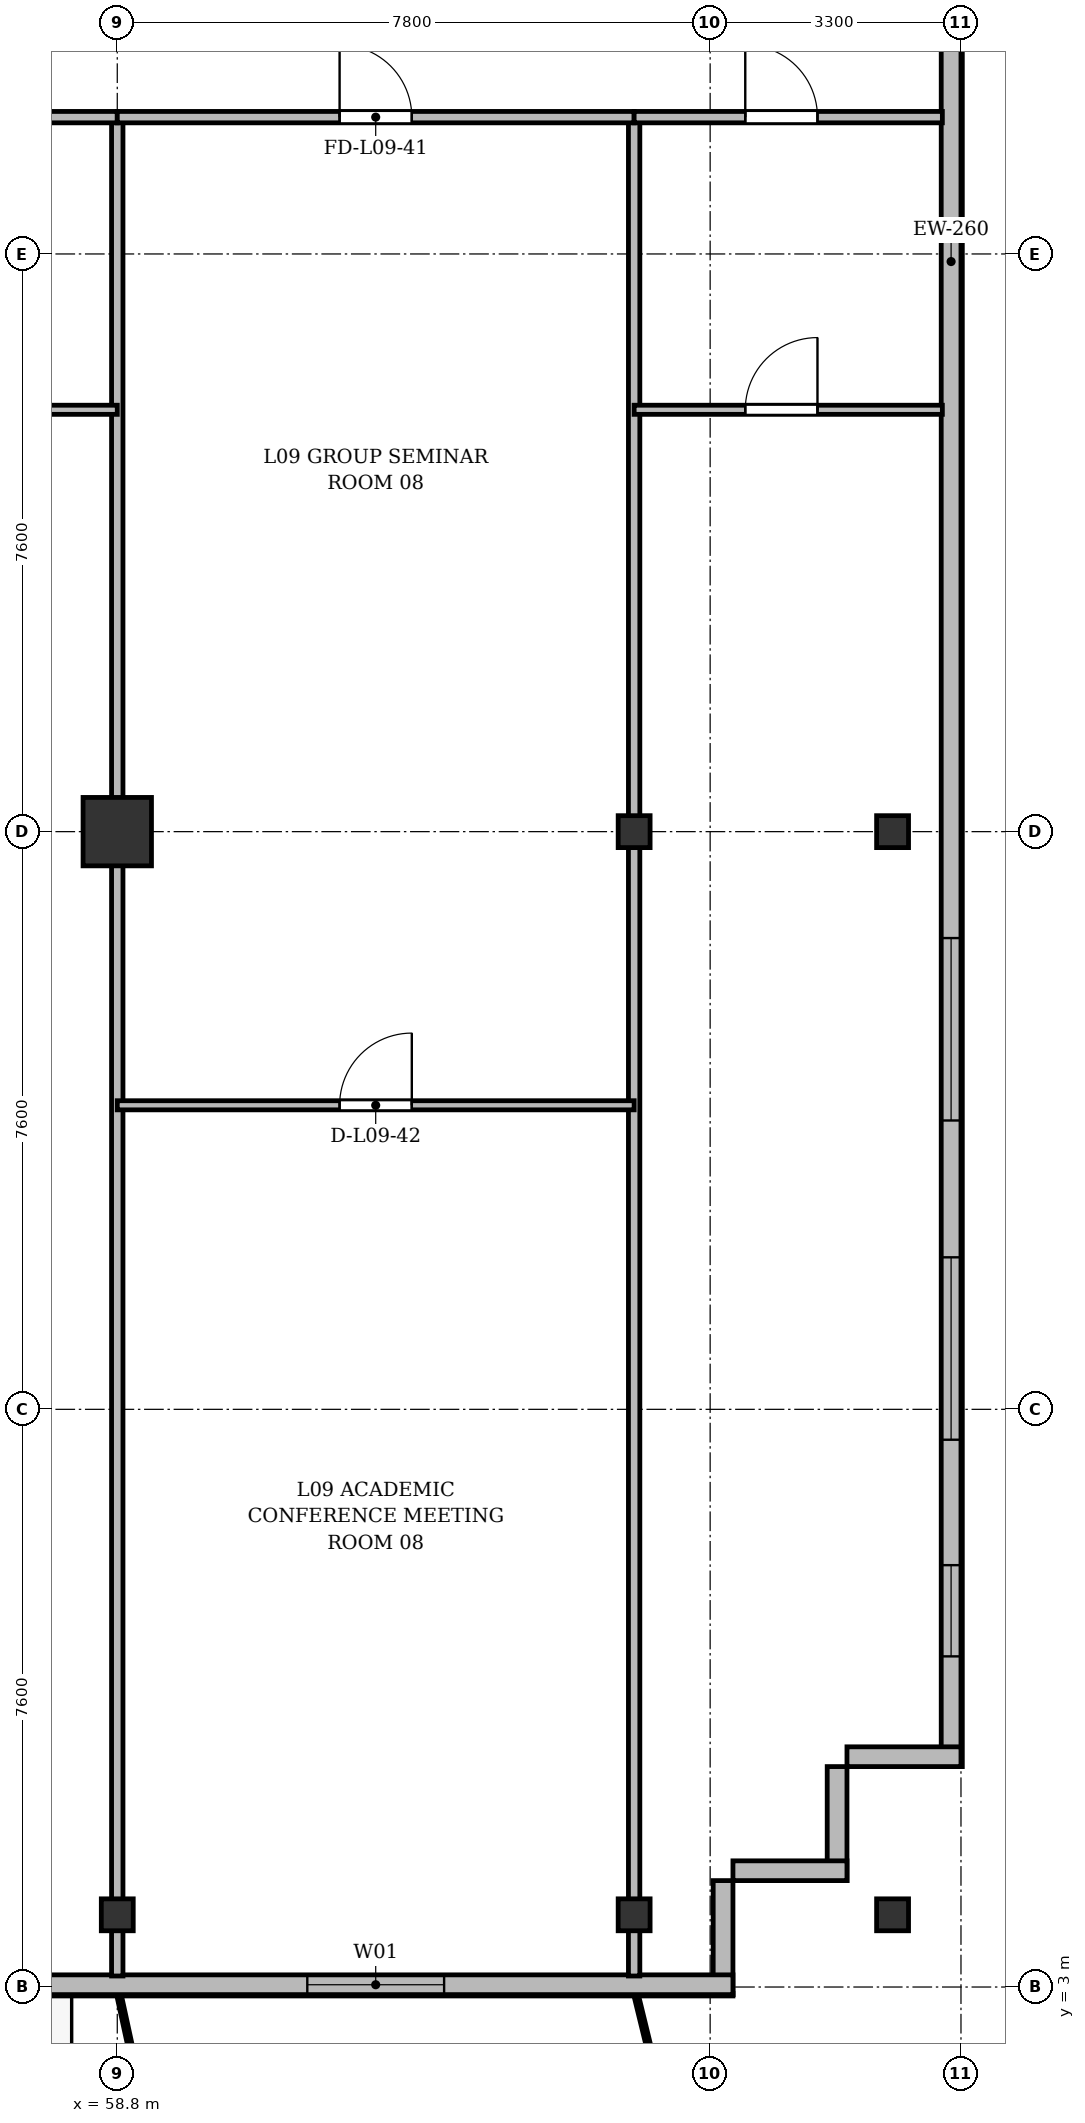
"""IFC4 building model, lengths in metres.
Left out: names, types, materials, properties, quantities, classifications, styles, units other than length and angle.
Written with IfcOpenShell. Run it as: python <this file> out.ifc"""

import sys

from ifc_helpers import new_model, si_unit, direction, frame, frame_2d, origin, origin_2d, place, context, subcontext, project, spatial, rectangle, i_section, extrude, source, transform, mapped, element, fill, save


model = new_model("IFC4")
c1 = context("Model", 3, precision=1e-05, world=origin(), true_north=direction((0.0, 1.0)))
c2 = subcontext(c1, "Body", "Model", "MODEL_VIEW")
j1 = project(units=[si_unit("LENGTHUNIT", "METRE"), si_unit("PLANEANGLEUNIT", "RADIAN")], contexts=[c1])
p1 = place(None, origin())
s1 = spatial("IfcSite", under=j1, at=p1, CompositionType="ELEMENT")
p2 = place(p1, origin())
s2 = spatial("IfcBuilding", under=s1, at=p2, CompositionType="ELEMENT")
p3 = place(p2, frame((0.0, 0.0, 37.9)))
s3 = spatial("IfcBuildingStorey", under=s2, at=p3, CompositionType="ELEMENT", Elevation=37.9)
m1 = source(origin(), c2, "Body", "SweptSolid", [
    extrude(i_section(OverallWidth=0.42, OverallDepth=0.42, WebThickness=0.026, FlangeThickness=0.04, at=origin_2d()), origin(), (0.0, 0.0, 1.0), 3.6),
])
p4 = place(p3, frame((58.8, 3.95, 0.0), z_axis=(0.0, 0.0, 1.0), x_axis=(1.0, 0.0, 0.0)))
e1 = element("IfcColumn", 1, at=p4, inside=s3, PredefinedType="COLUMN", context=c2, shape_type="MappedRepresentation", body=[
    mapped(m1, transform((0.0, 0.0, 0.0), x_axis=(1.0, 0.0, 0.0), y_axis=(0.0, 1.0, 0.0), z_axis=(0.0, 0.0, 1.0), scale=1.0)),
])
m2 = source(origin(), c2, "Body", "SweptSolid", [
    extrude(rectangle(XDim=0.9, YDim=0.9, at=origin_2d()), origin(), (0.0, 0.0, 1.0), 3.6),
])
p5 = place(p3, frame((58.8, 18.2, 0.0), z_axis=(0.0, 0.0, 1.0), x_axis=(1.0, 0.0, 0.0)))
e2 = element("IfcColumn", 2, at=p5, inside=s3, PredefinedType="COLUMN", context=c2, shape_type="MappedRepresentation", body=[
    mapped(m2, transform((0.0, 0.0, 0.0), x_axis=(1.0, 0.0, 0.0), y_axis=(0.0, 1.0, 0.0), z_axis=(0.0, 0.0, 1.0), scale=1.0)),
])
for number, where, z_axis, x_axis in (
    (3, (65.6, 3.95, 0.0), (0.0, 0.0, 1.0), (1.0, 0.0, 0.0)),
    (4, (65.6, 18.2, 0.0), (0.0, 0.0, 1.0), (1.0, 0.0, 0.0)),
    (5, (69.0, 3.95, 0.0), (0.0, 0.0, 1.0), (1.0, 0.0, 0.0)),
    (6, (69.0, 18.2, 0.0), (0.0, 0.0, 1.0), (1.0, 0.0, 0.0)),
):
    element("IfcColumn", number, at=place(p3, frame(where, z_axis=z_axis, x_axis=x_axis)), inside=s3, PredefinedType="COLUMN", context=c2, shape_type="MappedRepresentation", body=[
        mapped(m1, transform((0.0, 0.0, 0.0), x_axis=(1.0, 0.0, 0.0), y_axis=(0.0, 1.0, 0.0), z_axis=(0.0, 0.0, 1.0), scale=1.0)),
    ])
p6 = place(p3, frame((69.77, 45.5, 0.0), z_axis=(0.0, 0.0, 1.0), x_axis=(0.0, -1.0, 0.0)))
e7 = element("IfcWall", 7, at=p6, inside=s3, PredefinedType="SOLIDWALL", context=c2, shape_type="SweptSolid", body=[
    extrude(rectangle(XDim=39.6, YDim=0.26, at=frame_2d((19.8, 0.0))), origin(), (0.0, 0.0, 1.0), 3.34),
])
p7 = place(p6, frame((36.95, 0.0, 0.92)))
e8 = element("IfcOpeningElement", 8, at=p7, cuts=e7, PredefinedType="OPENING", context=c2, shape_type="SweptSolid", body=[
    extrude(rectangle(XDim=1.2, YDim=1.65, at=frame_2d((0.6, 0.825))), frame((0.0, 0.14, 0.0), z_axis=(0.0, -1.0, 0.0), x_axis=(1.0, 0.0, 0.0)), (0.0, 0.0, 1.0), 0.28),
])
p8 = place(p6, frame((32.9, 0.0, 0.92)))
e9 = element("IfcOpeningElement", 9, at=p8, cuts=e7, PredefinedType="OPENING", context=c2, shape_type="SweptSolid", body=[
    extrude(rectangle(XDim=2.4, YDim=2.1, at=frame_2d((1.2, 1.05))), frame((0.0, 0.14, 0.0), z_axis=(0.0, -1.0, 0.0), x_axis=(1.0, 0.0, 0.0)), (0.0, 0.0, 1.0), 0.28),
])
p9 = place(p6, frame((28.7, 0.0, 0.92)))
e10 = element("IfcOpeningElement", 10, at=p9, cuts=e7, PredefinedType="OPENING", context=c2, shape_type="SweptSolid", body=[
    extrude(rectangle(XDim=2.4, YDim=2.1, at=frame_2d((1.2, 1.05))), frame((0.0, 0.14, 0.0), z_axis=(0.0, -1.0, 0.0), x_axis=(1.0, 0.0, 0.0)), (0.0, 0.0, 1.0), 0.28),
])
p10 = place(p6, frame((7.5, 0.0, 0.92)))
e11 = element("IfcOpeningElement", 11, at=p10, cuts=e7, PredefinedType="OPENING", context=c2, shape_type="SweptSolid", body=[
    extrude(rectangle(XDim=2.4, YDim=2.1, at=frame_2d((1.2, 1.05))), frame((0.0, 0.14, 0.0), z_axis=(0.0, -1.0, 0.0), x_axis=(1.0, 0.0, 0.0)), (0.0, 0.0, 1.0), 0.28),
])
p11 = place(p6, frame((4.5, 0.0, 0.92)))
e12 = element("IfcOpeningElement", 12, at=p11, cuts=e7, PredefinedType="OPENING", context=c2, shape_type="SweptSolid", body=[
    extrude(rectangle(XDim=1.2, YDim=1.65, at=frame_2d((0.6, 0.825))), frame((0.0, 0.14, 0.0), z_axis=(0.0, -1.0, 0.0), x_axis=(1.0, 0.0, 0.0)), (0.0, 0.0, 1.0), 0.28),
])
p12 = place(p6, frame((1.15, 0.0, 0.92)))
e13 = element("IfcOpeningElement", 13, at=p12, cuts=e7, PredefinedType="OPENING", context=c2, shape_type="SweptSolid", body=[
    extrude(rectangle(XDim=1.2, YDim=1.65, at=frame_2d((0.6, 0.825))), frame((0.0, 0.14, 0.0), z_axis=(0.0, -1.0, 0.0), x_axis=(1.0, 0.0, 0.0)), (0.0, 0.0, 1.0), 0.28),
])
p13 = place(p3, frame((69.9, 6.03, 0.0), z_axis=(0.0, 0.0, 1.0), x_axis=(-1.0, 0.0, 0.0)))
e14 = element("IfcWall", 14, at=p13, inside=s3, PredefinedType="SOLIDWALL", context=c2, shape_type="SweptSolid", body=[
    extrude(rectangle(XDim=1.5, YDim=0.26, at=frame_2d((0.75, 0.0))), origin(), (0.0, 0.0, 1.0), 2.752),
])
for number, where, z_axis, x_axis in (
    (15, (68.27, 5.9, 0.0), (0.0, 0.0, 1.0), (0.0, -1.0, 0.0)),
    (16, (68.4, 4.53, 0.0), (0.0, 0.0, 1.0), (-1.0, 0.0, 0.0)),
):
    element("IfcWall", number, at=place(p3, frame(where, z_axis=z_axis, x_axis=x_axis)), inside=s3, PredefinedType="SOLIDWALL", context=c2, shape_type="SweptSolid", body=[
        extrude(rectangle(XDim=1.5, YDim=0.26, at=frame_2d((0.75, 0.0))), origin(), (0.0, 0.0, 1.0), 3.34),
    ])
p14 = place(p3, frame((66.77, 4.4, 0.0), z_axis=(0.0, 0.0, 1.0), x_axis=(0.0, -1.0, 0.0)))
e17 = element("IfcWall", 17, at=p14, inside=s3, PredefinedType="SOLIDWALL", context=c2, shape_type="SweptSolid", body=[
    extrude(rectangle(XDim=1.5, YDim=0.26, at=frame_2d((0.75, 0.0))), origin(), (0.0, 0.0, 1.0), 2.69),
])
p15 = place(p3, frame((66.9, 3.03, 0.0), z_axis=(0.0, 0.0, 1.0), x_axis=(-1.0, 0.0, 0.0)))
e18 = element("IfcWall", 18, at=p15, inside=s3, PredefinedType="SOLIDWALL", context=c2, shape_type="SweptSolid", body=[
    extrude(rectangle(XDim=59.4, YDim=0.26, at=frame_2d((29.7, 0.0))), origin(), (0.0, 0.0, 1.0), 3.34),
])
p16 = place(p15, frame((3.8, 0.0, 0.9)))
e19 = element("IfcOpeningElement", 19, at=p16, cuts=e18, PredefinedType="OPENING", context=c2, shape_type="SweptSolid", body=[
    extrude(rectangle(XDim=1.8, YDim=1.8, at=frame_2d((0.9, 0.9))), frame((0.0, 0.14, 0.0), z_axis=(0.0, -1.0, 0.0), x_axis=(1.0, 0.0, 0.0)), (0.0, 0.0, 1.0), 0.28),
])
p17 = place(p15, frame((9.565, 0.0, 0.0)))
e20 = element("IfcOpeningElement", 20, at=p17, cuts=e18, PredefinedType="OPENING", context=c2, shape_type="SweptSolid", body=[
    extrude(rectangle(XDim=1.2, YDim=2.2, at=frame_2d((0.6, 1.1))), frame((0.0, 0.14, 0.0), z_axis=(0.0, -1.0, 0.0), x_axis=(1.0, 0.0, 0.0)), (0.0, 0.0, 1.0), 0.28),
])
p18 = place(p15, frame((18.75, 0.0, 0.9)))
e21 = element("IfcOpeningElement", 21, at=p18, cuts=e18, PredefinedType="OPENING", context=c2, shape_type="SweptSolid", body=[
    extrude(rectangle(XDim=1.5, YDim=1.75, at=frame_2d((0.75, 0.875))), frame((0.0, 0.14, 0.0), z_axis=(0.0, -1.0, 0.0), x_axis=(1.0, 0.0, 0.0)), (0.0, 0.0, 1.0), 0.28),
])
p19 = place(p15, frame((28.7, 0.0, 0.9)))
e22 = element("IfcOpeningElement", 22, at=p19, cuts=e18, PredefinedType="OPENING", context=c2, shape_type="SweptSolid", body=[
    extrude(rectangle(XDim=2.0, YDim=1.95, at=frame_2d((1.0, 0.975))), frame((0.0, 0.14, 0.0), z_axis=(0.0, -1.0, 0.0), x_axis=(1.0, 0.0, 0.0)), (0.0, 0.0, 1.0), 0.28),
])
p20 = place(p15, frame((40.301, 0.0, 0.0)))
e23 = element("IfcOpeningElement", 23, at=p20, cuts=e18, PredefinedType="OPENING", context=c2, shape_type="SweptSolid", body=[
    extrude(rectangle(XDim=1.2, YDim=2.2, at=frame_2d((0.6, 1.1))), frame((0.0, 0.14, 0.0), z_axis=(0.0, -1.0, 0.0), x_axis=(1.0, 0.0, 0.0)), (0.0, 0.0, 1.0), 0.28),
])
p21 = place(p15, frame((46.5, 0.0, 0.9)))
e24 = element("IfcOpeningElement", 24, at=p21, cuts=e18, PredefinedType="OPENING", context=c2, shape_type="SweptSolid", body=[
    extrude(rectangle(XDim=1.8, YDim=1.8, at=frame_2d((0.9, 0.9))), frame((0.0, 0.14, 0.0), z_axis=(0.0, -1.0, 0.0), x_axis=(1.0, 0.0, 0.0)), (0.0, 0.0, 1.0), 0.28),
])
p22 = place(p15, frame((55.817, 0.0, 0.0)))
e25 = element("IfcOpeningElement", 25, at=p22, cuts=e18, PredefinedType="OPENING", context=c2, shape_type="SweptSolid", body=[
    extrude(rectangle(XDim=1.2, YDim=2.2, at=frame_2d((0.6, 1.1))), frame((0.0, 0.14, 0.0), z_axis=(0.0, -1.0, 0.0), x_axis=(1.0, 0.0, 0.0)), (0.0, 0.0, 1.0), 0.28),
])
for number, where, z_axis, x_axis in (
    (26, (58.8, 3.145, 0.0), (0.0, 0.0, 1.0), (0.0, 1.0, 0.0)),
    (27, (65.6, 3.145, 0.0), (0.0, 0.0, 1.0), (0.0, 1.0, 0.0)),
):
    element("IfcWall", number, at=place(p3, frame(where, z_axis=z_axis, x_axis=x_axis)), inside=s3, PredefinedType="PARTITIONING", context=c2, shape_type="SweptSolid", body=[
        extrude(rectangle(XDim=24.455, YDim=0.15, at=frame_2d((12.228, 0.0))), origin(), (0.0, 0.0, 1.0), 2.752),
    ])
p23 = place(p3, frame((51.0, 27.6, 0.0), z_axis=(0.0, 0.0, 1.0), x_axis=(1.0, 0.0, 0.0)))
e28 = element("IfcWall", 28, at=p23, inside=s3, PredefinedType="PARTITIONING", context=c2, shape_type="SweptSolid", body=[
    extrude(rectangle(XDim=7.8, YDim=0.15, at=frame_2d((3.9, 0.0))), origin(), (0.0, 0.0, 1.0), 2.752),
])
p24 = place(p23, frame((3.333, 0.0, 0.0)))
e29 = element("IfcOpeningElement", 29, at=p24, cuts=e28, PredefinedType="OPENING", context=c2, shape_type="SweptSolid", body=[
    extrude(rectangle(XDim=0.95, YDim=2.15, at=frame_2d((0.475, 1.075))), frame((0.0, 0.085, 0.0), z_axis=(0.0, -1.0, 0.0), x_axis=(1.0, 0.0, 0.0)), (0.0, 0.0, 1.0), 0.17),
])
p25 = place(p3, frame((51.0, 23.75, 0.0), z_axis=(0.0, 0.0, 1.0), x_axis=(1.0, 0.0, 0.0)))
e30 = element("IfcWall", 30, at=p25, inside=s3, PredefinedType="PARTITIONING", context=c2, shape_type="SweptSolid", body=[
    extrude(rectangle(XDim=7.8, YDim=0.12, at=frame_2d((3.9, 0.0))), origin(), (0.0, 0.0, 1.0), 2.752),
])
p26 = place(p25, frame((3.333, 0.0, 0.0)))
e31 = element("IfcOpeningElement", 31, at=p26, cuts=e30, PredefinedType="OPENING", context=c2, shape_type="SweptSolid", body=[
    extrude(rectangle(XDim=0.95, YDim=2.15, at=frame_2d((0.475, 1.075))), frame((0.0, 0.07, 0.0), z_axis=(0.0, -1.0, 0.0), x_axis=(1.0, 0.0, 0.0)), (0.0, 0.0, 1.0), 0.14),
])
p27 = place(p3, frame((58.8, 27.6, 0.0), z_axis=(0.0, 0.0, 1.0), x_axis=(1.0, 0.0, 0.0)))
e32 = element("IfcWall", 32, at=p27, inside=s3, PredefinedType="PARTITIONING", context=c2, shape_type="SweptSolid", body=[
    extrude(rectangle(XDim=6.8, YDim=0.15, at=frame_2d((3.4, 0.0))), origin(), (0.0, 0.0, 1.0), 2.752),
])
p28 = place(p27, frame((2.925, 0.0, 0.0)))
e33 = element("IfcOpeningElement", 33, at=p28, cuts=e32, PredefinedType="OPENING", context=c2, shape_type="SweptSolid", body=[
    extrude(rectangle(XDim=0.95, YDim=2.15, at=frame_2d((0.475, 1.075))), frame((0.0, 0.085, 0.0), z_axis=(0.0, -1.0, 0.0), x_axis=(1.0, 0.0, 0.0)), (0.0, 0.0, 1.0), 0.17),
])
p29 = place(p3, frame((58.8, 14.6, 0.0), z_axis=(0.0, 0.0, 1.0), x_axis=(1.0, 0.0, 0.0)))
e34 = element("IfcWall", 34, at=p29, inside=s3, PredefinedType="PARTITIONING", context=c2, shape_type="SweptSolid", body=[
    extrude(rectangle(XDim=6.8, YDim=0.12, at=frame_2d((3.4, 0.0))), origin(), (0.0, 0.0, 1.0), 2.752),
])
p30 = place(p29, frame((2.925, 0.0, 0.0)))
e35 = element("IfcOpeningElement", 35, at=p30, cuts=e34, PredefinedType="OPENING", context=c2, shape_type="SweptSolid", body=[
    extrude(rectangle(XDim=0.95, YDim=2.15, at=frame_2d((0.475, 1.075))), frame((0.0, 0.07, 0.0), z_axis=(0.0, -1.0, 0.0), x_axis=(1.0, 0.0, 0.0)), (0.0, 0.0, 1.0), 0.14),
])
p31 = place(p3, frame((65.6, 27.6, 0.0), z_axis=(0.0, 0.0, 1.0), x_axis=(1.0, 0.0, 0.0)))
e36 = element("IfcWall", 36, at=p31, inside=s3, PredefinedType="PARTITIONING", context=c2, shape_type="SweptSolid", body=[
    extrude(rectangle(XDim=4.055, YDim=0.15, at=frame_2d((2.027, 0.0))), origin(), (0.0, 0.0, 1.0), 2.752),
])
p32 = place(p31, frame((1.462, 0.0, 0.0)))
e37 = element("IfcOpeningElement", 37, at=p32, cuts=e36, PredefinedType="OPENING", context=c2, shape_type="SweptSolid", body=[
    extrude(rectangle(XDim=0.95, YDim=2.15, at=frame_2d((0.475, 1.075))), frame((0.0, 0.085, 0.0), z_axis=(0.0, -1.0, 0.0), x_axis=(1.0, 0.0, 0.0)), (0.0, 0.0, 1.0), 0.17),
])
p33 = place(p3, frame((65.6, 23.75, 0.0), z_axis=(0.0, 0.0, 1.0), x_axis=(1.0, 0.0, 0.0)))
e38 = element("IfcWall", 38, at=p33, inside=s3, PredefinedType="PARTITIONING", context=c2, shape_type="SweptSolid", body=[
    extrude(rectangle(XDim=4.055, YDim=0.12, at=frame_2d((2.027, 0.0))), origin(), (0.0, 0.0, 1.0), 2.752),
])
p34 = place(p33, frame((1.462, 0.0, 0.0)))
e39 = element("IfcOpeningElement", 39, at=p34, cuts=e38, PredefinedType="OPENING", context=c2, shape_type="SweptSolid", body=[
    extrude(rectangle(XDim=0.95, YDim=2.15, at=frame_2d((0.475, 1.075))), frame((0.0, 0.07, 0.0), z_axis=(0.0, -1.0, 0.0), x_axis=(1.0, 0.0, 0.0)), (0.0, 0.0, 1.0), 0.14),
])
m3 = source(origin(), c2, "Body", "SweptSolid", [
    extrude(rectangle(XDim=1.2, YDim=1.65, at=frame_2d((0.6, 0.825))), frame((0.0, 0.03, 0.0), z_axis=(0.0, -1.0, 0.0), x_axis=(1.0, 0.0, 0.0)), (0.0, 0.0, 1.0), 0.06),
])
p35 = place(p7, origin())
e40 = element("IfcWindow", 40, at=p35, inside=s3, PartitioningType="SINGLE_PANEL", PredefinedType="WINDOW", context=c2, shape_type="MappedRepresentation", body=[
    mapped(m3, transform((0.0, 0.0, 0.0), x_axis=(1.0, 0.0, 0.0), y_axis=(0.0, 1.0, 0.0), z_axis=(0.0, 0.0, 1.0), scale=1.0)),
])
fill(e8, e40)
m4 = source(origin(), c2, "Body", "SweptSolid", [
    extrude(rectangle(XDim=2.4, YDim=2.1, at=frame_2d((1.2, 1.05))), frame((0.0, 0.03, 0.0), z_axis=(0.0, -1.0, 0.0), x_axis=(1.0, 0.0, 0.0)), (0.0, 0.0, 1.0), 0.06),
])
p36 = place(p8, origin())
e41 = element("IfcWindow", 41, at=p36, inside=s3, PartitioningType="SINGLE_PANEL", PredefinedType="WINDOW", context=c2, shape_type="MappedRepresentation", body=[
    mapped(m4, transform((0.0, 0.0, 0.0), x_axis=(1.0, 0.0, 0.0), y_axis=(0.0, 1.0, 0.0), z_axis=(0.0, 0.0, 1.0), scale=1.0)),
])
fill(e9, e41)
p37 = place(p9, origin())
e42 = element("IfcWindow", 42, at=p37, inside=s3, PartitioningType="SINGLE_PANEL", PredefinedType="WINDOW", context=c2, shape_type="MappedRepresentation", body=[
    mapped(m4, transform((0.0, 0.0, 0.0), x_axis=(1.0, 0.0, 0.0), y_axis=(0.0, 1.0, 0.0), z_axis=(0.0, 0.0, 1.0), scale=1.0)),
])
fill(e10, e42)
m5 = source(origin(), c2, "Body", "SweptSolid", [
    extrude(rectangle(XDim=1.8, YDim=1.8, at=frame_2d((0.9, 0.9))), frame((0.0, 0.03, 0.0), z_axis=(0.0, -1.0, 0.0), x_axis=(1.0, 0.0, 0.0)), (0.0, 0.0, 1.0), 0.06),
])
p38 = place(p16, origin())
e43 = element("IfcWindow", 43, at=p38, inside=s3, PartitioningType="SINGLE_PANEL", PredefinedType="WINDOW", context=c2, shape_type="MappedRepresentation", body=[
    mapped(m5, transform((0.0, 0.0, 0.0), x_axis=(1.0, 0.0, 0.0), y_axis=(0.0, 1.0, 0.0), z_axis=(0.0, 0.0, 1.0), scale=1.0)),
])
fill(e19, e43)
m6 = source(origin(), c2, "Body", "SweptSolid", [
    extrude(rectangle(XDim=0.95, YDim=2.15, at=frame_2d((0.475, 1.075))), frame((0.0, 0.025, 0.0), z_axis=(0.0, -1.0, 0.0), x_axis=(1.0, 0.0, 0.0)), (0.0, 0.0, 1.0), 0.05),
])
p39 = place(p28, origin())
e44 = element("IfcDoor", 44, at=p39, inside=s3, OperationType="SINGLE_SWING_LEFT", PredefinedType="DOOR", context=c2, shape_type="MappedRepresentation", body=[
    mapped(m6, transform((0.0, 0.0, 0.0), x_axis=(1.0, 0.0, 0.0), y_axis=(0.0, 1.0, 0.0), z_axis=(0.0, 0.0, 1.0), scale=1.0)),
])
fill(e33, e44)
p40 = place(p30, origin())
e45 = element("IfcDoor", 45, at=p40, inside=s3, OperationType="SINGLE_SWING_RIGHT", PredefinedType="DOOR", context=c2, shape_type="MappedRepresentation", body=[
    mapped(m6, transform((0.0, 0.0, 0.0), x_axis=(1.0, 0.0, 0.0), y_axis=(0.0, 1.0, 0.0), z_axis=(0.0, 0.0, 1.0), scale=1.0)),
])
fill(e35, e45)
p41 = place(p32, origin())
e46 = element("IfcDoor", 46, at=p41, inside=s3, OperationType="SINGLE_SWING_LEFT", PredefinedType="DOOR", context=c2, shape_type="MappedRepresentation", body=[
    mapped(m6, transform((0.0, 0.0, 0.0), x_axis=(1.0, 0.0, 0.0), y_axis=(0.0, 1.0, 0.0), z_axis=(0.0, 0.0, 1.0), scale=1.0)),
])
fill(e37, e46)
p42 = place(p34, origin())
e47 = element("IfcDoor", 47, at=p42, inside=s3, OperationType="SINGLE_SWING_RIGHT", PredefinedType="DOOR", context=c2, shape_type="MappedRepresentation", body=[
    mapped(m6, transform((0.0, 0.0, 0.0), x_axis=(1.0, 0.0, 0.0), y_axis=(0.0, 1.0, 0.0), z_axis=(0.0, 0.0, 1.0), scale=1.0)),
])
fill(e39, e47)
save(model, sys.argv[1])
